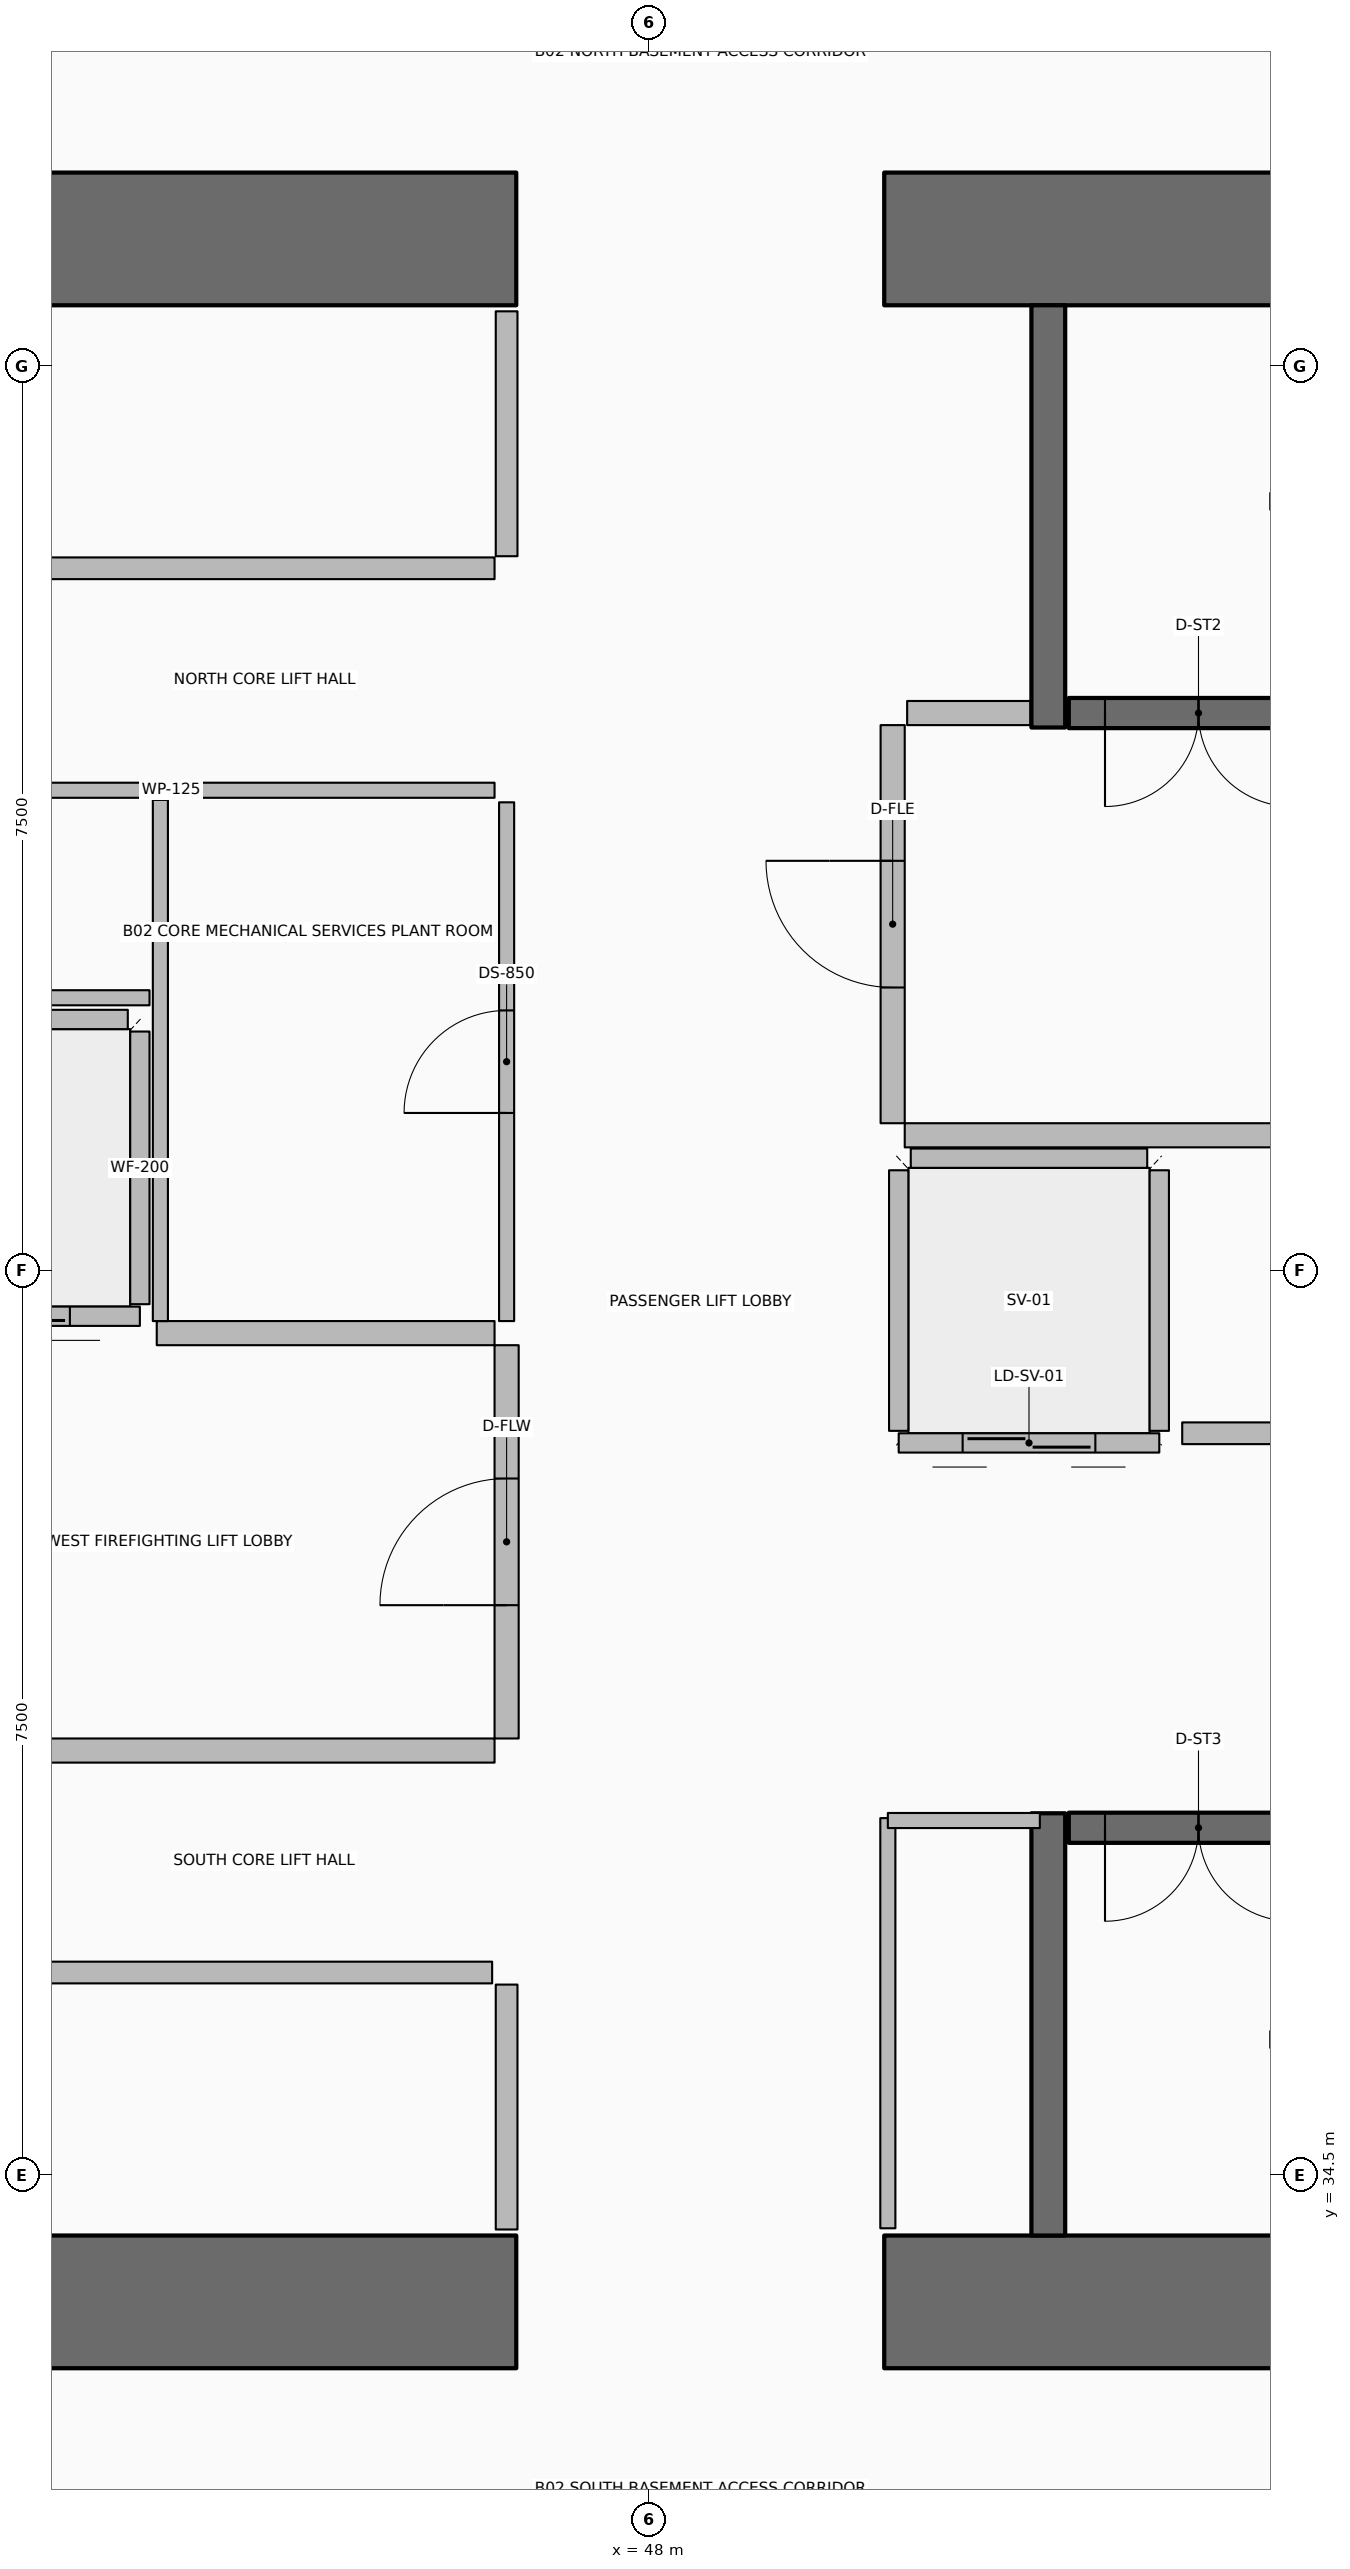
"""IFC4 building model, lengths in metres.
Left out: names, types, materials, properties, quantities, classifications, styles, units other than length and angle.
Written with IfcOpenShell. Run it as: python <this file> out.ifc"""

import sys

from ifc_helpers import new_model, si_unit, direction, frame, frame_2d, origin, place, context, subcontext, project, spatial, rectangle, extrude, element, fill, save


model = new_model("IFC4")
c1 = context("Model", 3, precision=1e-05, world=origin(), true_north=direction((0.0, 1.0)))
c2 = subcontext(c1, "Body", "Model", "MODEL_VIEW")
j1 = project(units=[si_unit("LENGTHUNIT", "METRE"), si_unit("PLANEANGLEUNIT", "RADIAN")], contexts=[c1])
p1 = place(None, origin())
s1 = spatial("IfcSite", under=j1, at=p1, CompositionType="ELEMENT")
p2 = place(p1, origin())
s2 = spatial("IfcBuilding", under=s1, at=p2, CompositionType="ELEMENT")
p3 = place(p2, frame((0.0, 0.0, -7.6)))
s3 = spatial("IfcBuildingStorey", under=s2, at=p3, CompositionType="ELEMENT", Elevation=-7.6)
for number, where, z_axis, x_axis in (
    (1, (36.7, 33.45, 0.0), (0.0, 0.0, 1.0), (1.0, 0.0, 0.0)),
    (2, (49.95, 33.45, 0.0), (0.0, 0.0, 1.0), (1.0, 0.0, 0.0)),
    (3, (36.7, 50.55, 0.0), (0.0, 0.0, 1.0), (1.0, 0.0, 0.0)),
    (4, (49.95, 50.55, 0.0), (0.0, 0.0, 1.0), (1.0, 0.0, 0.0)),
):
    element("IfcWall", number, at=place(p3, frame(where, z_axis=z_axis, x_axis=x_axis)), inside=s3, PredefinedType="SHEAR", context=c2, shape_type="SweptSolid", body=[
        extrude(rectangle(XDim=10.2, YDim=1.1, at=frame_2d((5.1, 0.0))), origin(), (0.0, 0.0, 1.0), 3.8),
    ])
for number, where, z_axis, x_axis in (
    (5, (51.31, 46.5, 0.0), (0.0, 0.0, 1.0), (0.0, 1.0, 0.0)),
    (6, (51.31, 34.0, 0.0), (0.0, 0.0, 1.0), (0.0, 1.0, 0.0)),
):
    element("IfcWall", number, at=place(p3, frame(where, z_axis=z_axis, x_axis=x_axis)), inside=s3, PredefinedType="SHEAR", context=c2, shape_type="SweptSolid", body=[
        extrude(rectangle(XDim=3.5, YDim=0.28, at=frame_2d((1.75, 0.0))), origin(), (0.0, 0.0, 1.0), 3.8),
    ])
p4 = place(p3, frame((51.48, 46.62, 0.0), z_axis=(0.0, 0.0, 1.0), x_axis=(1.0, 0.0, 0.0)))
e7 = element("IfcWall", 7, at=p4, inside=s3, PredefinedType="SOLIDWALL", context=c2, shape_type="SweptSolid", body=[
    extrude(rectangle(XDim=7.54, YDim=0.25, at=frame_2d((3.77, 0.0))), origin(), (0.0, 0.0, 1.0), 3.52),
])
p5 = place(p4, frame((0.3, 0.0, 0.0)))
e8 = element("IfcOpeningElement", 8, at=p5, cuts=e7, PredefinedType="OPENING", context=c2, shape_type="SweptSolid", body=[
    extrude(rectangle(XDim=1.55, YDim=2.15, at=frame_2d((0.775, 1.075))), frame((0.0, 0.135, 0.0), z_axis=(0.0, -1.0, 0.0), x_axis=(1.0, 0.0, 0.0)), (0.0, 0.0, 1.0), 0.27),
])
p6 = place(p3, frame((51.48, 37.38, 0.0), z_axis=(0.0, 0.0, 1.0), x_axis=(1.0, 0.0, 0.0)))
e9 = element("IfcWall", 9, at=p6, inside=s3, PredefinedType="SOLIDWALL", context=c2, shape_type="SweptSolid", body=[
    extrude(rectangle(XDim=7.54, YDim=0.25, at=frame_2d((3.77, 0.0))), origin(), (0.0, 0.0, 1.0), 3.52),
])
p7 = place(p6, frame((0.3, 0.0, 0.0)))
e10 = element("IfcOpeningElement", 10, at=p7, cuts=e9, PredefinedType="OPENING", context=c2, shape_type="SweptSolid", body=[
    extrude(rectangle(XDim=1.55, YDim=2.15, at=frame_2d((0.775, 1.075))), frame((0.0, 0.135, 0.0), z_axis=(0.0, -1.0, 0.0), x_axis=(1.0, 0.0, 0.0)), (0.0, 0.0, 1.0), 0.27),
])
p8 = place(p3, frame((43.78, 41.62, 0.0), z_axis=(0.0, 0.0, 1.0), x_axis=(-1.0, 0.0, 0.0)))
e11 = element("IfcWall", 11, at=p8, inside=s3, PredefinedType="PARTITIONING", context=c2, shape_type="SweptSolid", body=[
    extrude(rectangle(XDim=2.26, YDim=0.16, at=frame_2d((1.13, 0.0))), origin(), (0.0, 0.0, 1.0), 3.52),
])
p9 = place(p8, frame((0.58, 0.0, 0.0)))
e12 = element("IfcOpeningElement", 12, at=p9, cuts=e11, PredefinedType="OPENING", context=c2, shape_type="SweptSolid", body=[
    extrude(rectangle(XDim=1.1, YDim=2.1, at=frame_2d((0.55, 1.05))), frame((0.0, 0.09, 0.0), z_axis=(0.0, -1.0, 0.0), x_axis=(1.0, 0.0, 0.0)), (0.0, 0.0, 1.0), 0.18),
])
p10 = place(p3, frame((43.78, 41.72, 0.0), z_axis=(0.0, 0.0, 1.0), x_axis=(0.0, 1.0, 0.0)))
e13 = element("IfcWall", 13, at=p10, inside=s3, PredefinedType="PARTITIONING", context=c2, shape_type="SweptSolid", body=[
    extrude(rectangle(XDim=2.26, YDim=0.16, at=frame_2d((1.13, 0.0))), origin(), (0.0, 0.0, 1.0), 3.52),
])
p11 = place(p3, frame((41.62, 44.08, 0.0), z_axis=(0.0, 0.0, 1.0), x_axis=(1.0, 0.0, 0.0)))
e14 = element("IfcWall", 14, at=p11, inside=s3, PredefinedType="PARTITIONING", context=c2, shape_type="SweptSolid", body=[
    extrude(rectangle(XDim=2.06, YDim=0.16, at=frame_2d((1.03, 0.0))), origin(), (0.0, 0.0, 1.0), 3.52),
])
p12 = place(p3, frame((52.23, 40.57, 0.0), z_axis=(0.0, 0.0, 1.0), x_axis=(-1.0, 0.0, 0.0)))
e15 = element("IfcWall", 15, at=p12, inside=s3, PredefinedType="PARTITIONING", context=c2, shape_type="SweptSolid", body=[
    extrude(rectangle(XDim=2.16, YDim=0.16, at=frame_2d((1.08, 0.0))), origin(), (0.0, 0.0, 1.0), 3.52),
])
p13 = place(p12, frame((0.53, 0.0, 0.0)))
e16 = element("IfcOpeningElement", 16, at=p13, cuts=e15, PredefinedType="OPENING", context=c2, shape_type="SweptSolid", body=[
    extrude(rectangle(XDim=1.1, YDim=2.1, at=frame_2d((0.55, 1.05))), frame((0.0, 0.09, 0.0), z_axis=(0.0, -1.0, 0.0), x_axis=(1.0, 0.0, 0.0)), (0.0, 0.0, 1.0), 0.18),
])
for number, where, z_axis, x_axis in (
    (17, (52.23, 40.67, 0.0), (0.0, 0.0, 1.0), (0.0, 1.0, 0.0)),
    (18, (50.07, 40.67, 0.0), (0.0, 0.0, 1.0), (0.0, 1.0, 0.0)),
):
    element("IfcWall", number, at=place(p3, frame(where, z_axis=z_axis, x_axis=x_axis)), inside=s3, PredefinedType="PARTITIONING", context=c2, shape_type="SweptSolid", body=[
        extrude(rectangle(XDim=2.16, YDim=0.16, at=frame_2d((1.08, 0.0))), origin(), (0.0, 0.0, 1.0), 3.52),
    ])
p14 = place(p3, frame((50.17, 42.93, 0.0), z_axis=(0.0, 0.0, 1.0), x_axis=(1.0, 0.0, 0.0)))
e19 = element("IfcWall", 19, at=p14, inside=s3, PredefinedType="PARTITIONING", context=c2, shape_type="SweptSolid", body=[
    extrude(rectangle(XDim=1.96, YDim=0.16, at=frame_2d((0.98, 0.0))), origin(), (0.0, 0.0, 1.0), 3.52),
])
p15 = place(p3, frame((37.92, 36.18, 0.0), z_axis=(0.0, 0.0, 1.0), x_axis=(1.0, 0.0, 0.0)))
e20 = element("IfcWall", 20, at=p15, inside=s3, PredefinedType="PARTITIONING", context=c2, shape_type="SweptSolid", body=[
    extrude(rectangle(XDim=8.78, YDim=0.18, at=frame_2d((4.39, 0.0))), origin(), (0.0, 0.0, 1.0), 3.52),
])
p16 = place(p15, frame((3.965, 0.0, 0.0)))
e21 = element("IfcOpeningElement", 21, at=p16, cuts=e20, PredefinedType="OPENING", context=c2, shape_type="SweptSolid", body=[
    extrude(rectangle(XDim=0.85, YDim=2.06, at=frame_2d((0.425, 1.03))), frame((0.0, 0.1, 0.0), z_axis=(0.0, -1.0, 0.0), x_axis=(1.0, 0.0, 0.0)), (0.0, 0.0, 1.0), 0.2),
])
p17 = place(p3, frame((46.82, 34.05, 0.0), z_axis=(0.0, 0.0, 1.0), x_axis=(0.0, 1.0, 0.0)))
e22 = element("IfcWall", 22, at=p17, inside=s3, PredefinedType="PARTITIONING", context=c2, shape_type="SweptSolid", body=[
    extrude(rectangle(XDim=2.03, YDim=0.18, at=frame_2d((1.015, 0.0))), origin(), (0.0, 0.0, 1.0), 3.52),
])
p18 = place(p3, frame((37.92, 47.82, 0.0), z_axis=(0.0, 0.0, 1.0), x_axis=(1.0, 0.0, 0.0)))
e23 = element("IfcWall", 23, at=p18, inside=s3, PredefinedType="PARTITIONING", context=c2, shape_type="SweptSolid", body=[
    extrude(rectangle(XDim=8.8, YDim=0.18, at=frame_2d((4.4, 0.0))), origin(), (0.0, 0.0, 1.0), 3.52),
])
p19 = place(p18, frame((3.975, 0.0, 0.0)))
e24 = element("IfcOpeningElement", 24, at=p19, cuts=e23, PredefinedType="OPENING", context=c2, shape_type="SweptSolid", body=[
    extrude(rectangle(XDim=0.85, YDim=2.06, at=frame_2d((0.425, 1.03))), frame((0.0, 0.1, 0.0), z_axis=(0.0, -1.0, 0.0), x_axis=(1.0, 0.0, 0.0)), (0.0, 0.0, 1.0), 0.2),
])
p20 = place(p3, frame((46.82, 47.92, 0.0), z_axis=(0.0, 0.0, 1.0), x_axis=(0.0, 1.0, 0.0)))
e25 = element("IfcWall", 25, at=p20, inside=s3, PredefinedType="PARTITIONING", context=c2, shape_type="SweptSolid", body=[
    extrude(rectangle(XDim=2.03, YDim=0.18, at=frame_2d((1.015, 0.0))), origin(), (0.0, 0.0, 1.0), 3.52),
])
p21 = place(p3, frame((52.42, 40.65, 0.0), z_axis=(0.0, 0.0, 1.0), x_axis=(1.0, 0.0, 0.0)))
e26 = element("IfcWall", 26, at=p21, inside=s3, PredefinedType="PARTITIONING", context=c2, shape_type="SweptSolid", body=[
    extrude(rectangle(XDim=6.5, YDim=0.18, at=frame_2d((3.25, 0.0))), origin(), (0.0, 0.0, 1.0), 3.52),
])
p22 = place(p21, frame((2.825, 0.0, 0.0)))
e27 = element("IfcOpeningElement", 27, at=p22, cuts=e26, PredefinedType="OPENING", context=c2, shape_type="SweptSolid", body=[
    extrude(rectangle(XDim=0.85, YDim=2.06, at=frame_2d((0.425, 1.03))), frame((0.0, 0.1, 0.0), z_axis=(0.0, -1.0, 0.0), x_axis=(1.0, 0.0, 0.0)), (0.0, 0.0, 1.0), 0.2),
])
p23 = place(p3, frame((41.35, 38.02, 0.0), z_axis=(0.0, 0.0, 1.0), x_axis=(1.0, 0.0, 0.0)))
e28 = element("IfcWall", 28, at=p23, inside=s3, PredefinedType="PARTITIONING", context=c2, shape_type="SweptSolid", body=[
    extrude(rectangle(XDim=5.37, YDim=0.2, at=frame_2d((2.685, 0.0))), origin(), (0.0, 0.0, 1.0), 3.52),
])
p24 = place(p3, frame((43.92, 41.48, 0.0), z_axis=(0.0, 0.0, 1.0), x_axis=(1.0, 0.0, 0.0)))
e29 = element("IfcWall", 29, at=p24, inside=s3, PredefinedType="PARTITIONING", context=c2, shape_type="SweptSolid", body=[
    extrude(rectangle(XDim=2.8, YDim=0.2, at=frame_2d((1.4, 0.0))), origin(), (0.0, 0.0, 1.0), 3.52),
])
p25 = place(p3, frame((46.82, 38.12, 0.0), z_axis=(0.0, 0.0, 1.0), x_axis=(0.0, 1.0, 0.0)))
e30 = element("IfcWall", 30, at=p25, inside=s3, PredefinedType="PARTITIONING", context=c2, shape_type="SweptSolid", body=[
    extrude(rectangle(XDim=3.26, YDim=0.2, at=frame_2d((1.63, 0.0))), origin(), (0.0, 0.0, 1.0), 3.52),
])
p26 = place(p25, frame((1.105, 0.0, 0.0)))
e31 = element("IfcOpeningElement", 31, at=p26, cuts=e30, PredefinedType="OPENING", context=c2, shape_type="SweptSolid", body=[
    extrude(rectangle(XDim=1.05, YDim=2.1, at=frame_2d((0.525, 1.05))), frame((0.0, 0.11, 0.0), z_axis=(0.0, -1.0, 0.0), x_axis=(1.0, 0.0, 0.0)), (0.0, 0.0, 1.0), 0.22),
])
p27 = place(p3, frame((50.12, 43.12, 0.0), z_axis=(0.0, 0.0, 1.0), x_axis=(1.0, 0.0, 0.0)))
e32 = element("IfcWall", 32, at=p27, inside=s3, PredefinedType="PARTITIONING", context=c2, shape_type="SweptSolid", body=[
    extrude(rectangle(XDim=8.88, YDim=0.2, at=frame_2d((4.44, 0.0))), origin(), (0.0, 0.0, 1.0), 3.52),
])
p28 = place(p3, frame((50.14, 46.62, 0.0), z_axis=(0.0, 0.0, 1.0), x_axis=(1.0, 0.0, 0.0)))
e33 = element("IfcWall", 33, at=p28, inside=s3, PredefinedType="PARTITIONING", context=c2, shape_type="SweptSolid", body=[
    extrude(rectangle(XDim=1.02, YDim=0.2, at=frame_2d((0.51, 0.0))), origin(), (0.0, 0.0, 1.0), 3.52),
])
p29 = place(p3, frame((50.02, 43.22, 0.0), z_axis=(0.0, 0.0, 1.0), x_axis=(0.0, 1.0, 0.0)))
e34 = element("IfcWall", 34, at=p29, inside=s3, PredefinedType="PARTITIONING", context=c2, shape_type="SweptSolid", body=[
    extrude(rectangle(XDim=3.3, YDim=0.2, at=frame_2d((1.65, 0.0))), origin(), (0.0, 0.0, 1.0), 3.52),
])
p30 = place(p29, frame((1.125, 0.0, 0.0)))
e35 = element("IfcOpeningElement", 35, at=p30, cuts=e34, PredefinedType="OPENING", context=c2, shape_type="SweptSolid", body=[
    extrude(rectangle(XDim=1.05, YDim=2.1, at=frame_2d((0.525, 1.05))), frame((0.0, 0.11, 0.0), z_axis=(0.0, -1.0, 0.0), x_axis=(1.0, 0.0, 0.0)), (0.0, 0.0, 1.0), 0.22),
])
p31 = place(p3, frame((41.36, 45.98, 0.0), z_axis=(0.0, 0.0, 1.0), x_axis=(1.0, 0.0, 0.0)))
e36 = element("IfcWall", 36, at=p31, inside=s3, PredefinedType="PARTITIONING", context=c2, shape_type="SweptSolid", body=[
    extrude(rectangle(XDim=5.36, YDim=0.125, at=frame_2d((2.68, 0.0))), origin(), (0.0, 0.0, 1.0), 2.96),
])
p32 = place(p3, frame((41.36, 44.26, 0.0), z_axis=(0.0, 0.0, 1.0), x_axis=(1.0, 0.0, 0.0)))
e37 = element("IfcWall", 37, at=p32, inside=s3, PredefinedType="PARTITIONING", context=c2, shape_type="SweptSolid", body=[
    extrude(rectangle(XDim=2.5, YDim=0.125, at=frame_2d((1.25, 0.0))), origin(), (0.0, 0.0, 1.0), 2.96),
])
p33 = place(p3, frame((49.98, 34.06, 0.0), z_axis=(0.0, 0.0, 1.0), x_axis=(0.0, 1.0, 0.0)))
e38 = element("IfcWall", 38, at=p33, inside=s3, PredefinedType="PARTITIONING", context=c2, shape_type="SweptSolid", body=[
    extrude(rectangle(XDim=3.4, YDim=0.125, at=frame_2d((1.7, 0.0))), origin(), (0.0, 0.0, 1.0), 2.96),
])
p34 = place(p3, frame((49.98, 37.44, 0.0), z_axis=(0.0, 0.0, 1.0), x_axis=(1.0, 0.0, 0.0)))
e39 = element("IfcWall", 39, at=p34, inside=s3, PredefinedType="PARTITIONING", context=c2, shape_type="SweptSolid", body=[
    extrude(rectangle(XDim=1.26, YDim=0.125, at=frame_2d((0.63, 0.0))), origin(), (0.0, 0.0, 1.0), 2.96),
])
p35 = place(p3, frame((43.95, 41.58, 0.0), z_axis=(0.0, 0.0, 1.0), x_axis=(0.0, 1.0, 0.0)))
e40 = element("IfcWall", 40, at=p35, inside=s3, PredefinedType="PARTITIONING", context=c2, shape_type="SweptSolid", body=[
    extrude(rectangle(XDim=4.32, YDim=0.125, at=frame_2d((2.16, 0.0))), origin(), (0.0, 0.0, 1.0), 2.96),
])
p36 = place(p3, frame((46.82, 41.58, 0.0), z_axis=(0.0, 0.0, 1.0), x_axis=(0.0, 1.0, 0.0)))
e41 = element("IfcWall", 41, at=p36, inside=s3, PredefinedType="PARTITIONING", context=c2, shape_type="SweptSolid", body=[
    extrude(rectangle(XDim=4.3, YDim=0.125, at=frame_2d((2.15, 0.0))), origin(), (0.0, 0.0, 1.0), 2.96),
])
p37 = place(p36, frame((1.725, 0.0, 0.0)))
e42 = element("IfcOpeningElement", 42, at=p37, cuts=e41, PredefinedType="OPENING", context=c2, shape_type="SweptSolid", body=[
    extrude(rectangle(XDim=0.85, YDim=2.06, at=frame_2d((0.425, 1.03))), frame((0.0, 0.073, 0.0), z_axis=(0.0, -1.0, 0.0), x_axis=(1.0, 0.0, 0.0)), (0.0, 0.0, 1.0), 0.145),
])
p38 = place(p5, origin())
e43 = element("IfcDoor", 43, at=p38, inside=s3, OperationType="DOUBLE_DOOR_SINGLE_SWING", PredefinedType="DOOR", context=c2, shape_type="SweptSolid", body=[
    extrude(rectangle(XDim=1.55, YDim=2.15, at=frame_2d((0.775, 1.075))), frame((0.0, 0.025, 0.0), z_axis=(0.0, -1.0, 0.0), x_axis=(1.0, 0.0, 0.0)), (0.0, 0.0, 1.0), 0.05),
])
fill(e8, e43)
p39 = place(p7, origin())
e44 = element("IfcDoor", 44, at=p39, inside=s3, OperationType="DOUBLE_DOOR_SINGLE_SWING", PredefinedType="DOOR", context=c2, shape_type="SweptSolid", body=[
    extrude(rectangle(XDim=1.55, YDim=2.15, at=frame_2d((0.775, 1.075))), frame((0.0, 0.025, 0.0), z_axis=(0.0, -1.0, 0.0), x_axis=(1.0, 0.0, 0.0)), (0.0, 0.0, 1.0), 0.05),
])
fill(e10, e44)
p40 = place(p9, origin())
e45 = element("IfcDoor", 45, at=p40, inside=s3, OperationType="DOUBLE_DOOR_SLIDING", PredefinedType="DOOR", context=c2, shape_type="SweptSolid", body=[
    extrude(rectangle(XDim=1.1, YDim=2.1, at=frame_2d((0.55, 1.05))), frame((0.0, 0.025, 0.0), z_axis=(0.0, -1.0, 0.0), x_axis=(1.0, 0.0, 0.0)), (0.0, 0.0, 1.0), 0.05),
])
fill(e12, e45)
p41 = place(p13, origin())
e46 = element("IfcDoor", 46, at=p41, inside=s3, OperationType="DOUBLE_DOOR_SLIDING", PredefinedType="DOOR", context=c2, shape_type="SweptSolid", body=[
    extrude(rectangle(XDim=1.1, YDim=2.1, at=frame_2d((0.55, 1.05))), frame((0.0, 0.025, 0.0), z_axis=(0.0, -1.0, 0.0), x_axis=(1.0, 0.0, 0.0)), (0.0, 0.0, 1.0), 0.05),
])
fill(e16, e46)
p42 = place(p26, origin())
e47 = element("IfcDoor", 47, at=p42, inside=s3, OperationType="SINGLE_SWING_LEFT", PredefinedType="DOOR", context=c2, shape_type="SweptSolid", body=[
    extrude(rectangle(XDim=1.05, YDim=2.1, at=frame_2d((0.525, 1.05))), frame((0.0, 0.025, 0.0), z_axis=(0.0, -1.0, 0.0), x_axis=(1.0, 0.0, 0.0)), (0.0, 0.0, 1.0), 0.05),
])
fill(e31, e47)
p43 = place(p30, origin())
e48 = element("IfcDoor", 48, at=p43, inside=s3, OperationType="SINGLE_SWING_RIGHT", PredefinedType="DOOR", context=c2, shape_type="SweptSolid", body=[
    extrude(rectangle(XDim=1.05, YDim=2.1, at=frame_2d((0.525, 1.05))), frame((0.0, 0.025, 0.0), z_axis=(0.0, -1.0, 0.0), x_axis=(1.0, 0.0, 0.0)), (0.0, 0.0, 1.0), 0.05),
])
fill(e35, e48)
p44 = place(p37, origin())
e49 = element("IfcDoor", 49, at=p44, inside=s3, OperationType="SINGLE_SWING_LEFT", PredefinedType="DOOR", context=c2, shape_type="SweptSolid", body=[
    extrude(rectangle(XDim=0.85, YDim=2.06, at=frame_2d((0.425, 1.03))), frame((0.0, 0.025, 0.0), z_axis=(0.0, -1.0, 0.0), x_axis=(1.0, 0.0, 0.0)), (0.0, 0.0, 1.0), 0.05),
])
fill(e42, e49)
save(model, sys.argv[1])
